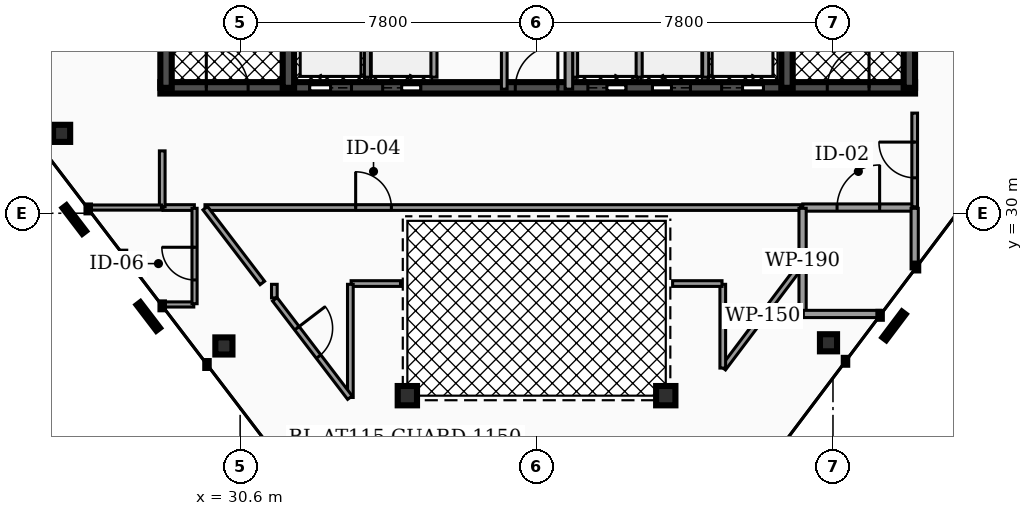
"""IFC4 building model, lengths in metres.
Left out: names, types, materials, properties, quantities, classifications, styles, units other than length and angle.
Written with IfcOpenShell. Run it as: python <this file> out.ifc"""

import sys

from ifc_helpers import new_model, si_unit, direction, frame, frame_2d, origin, origin_2d, place, context, subcontext, project, spatial, rectangle, hollow_rectangle, hollow_circle, extrude, element, fill, save


model = new_model("IFC4")
c1 = context("Model", 3, precision=1e-05, world=origin(), true_north=direction((0.0, 1.0)))
c2 = subcontext(c1, "Body", "Model", "MODEL_VIEW")
j1 = project(units=[si_unit("LENGTHUNIT", "METRE"), si_unit("PLANEANGLEUNIT", "RADIAN")], contexts=[c1])
p1 = place(None, origin())
s1 = spatial("IfcSite", under=j1, at=p1, CompositionType="ELEMENT")
p2 = place(p1, origin())
s2 = spatial("IfcBuilding", under=s1, at=p2, CompositionType="ELEMENT")
p3 = place(p2, frame((0.0, 0.0, 295.8)))
s3 = spatial("IfcBuildingStorey", under=s2, at=p3, CompositionType="ELEMENT", Elevation=295.8)
p4 = place(p3, frame((28.5, 33.3, 0.0), z_axis=(0.0, 0.0, 1.0), x_axis=(1.0, 0.0, 0.0)))
e1 = element("IfcWall", 1, at=p4, inside=s3, PredefinedType="SHEAR", context=c2, shape_type="SweptSolid", body=[
    extrude(rectangle(XDim=19.86, YDim=0.3, at=frame_2d((9.93, 0.0))), origin(), (0.0, 0.0, 1.0), 3.18),
])
p5 = place(p4, frame((3.93, 0.0, 0.0)))
e2 = element("IfcOpeningElement", 2, at=p5, cuts=e1, PredefinedType="OPENING", context=c2, shape_type="SweptSolid", body=[
    extrude(rectangle(XDim=1.1, YDim=2.15, at=frame_2d((0.55, 1.075))), frame((0.0, 0.16, 0.0), z_axis=(0.0, -1.0, 0.0), x_axis=(1.0, 0.0, 0.0)), (0.0, 0.0, 1.0), 0.32),
])
p6 = place(p4, frame((14.77, 0.0, 0.0)))
e3 = element("IfcOpeningElement", 3, at=p6, cuts=e1, PredefinedType="OPENING", context=c2, shape_type="SweptSolid", body=[
    extrude(rectangle(XDim=1.1, YDim=2.15, at=frame_2d((0.55, 1.075))), frame((0.0, 0.16, 0.0), z_axis=(0.0, -1.0, 0.0), x_axis=(1.0, 0.0, 0.0)), (0.0, 0.0, 1.0), 0.32),
])
p7 = place(p4, frame((11.25, 0.0, 0.0)))
e4 = element("IfcOpeningElement", 4, at=p7, cuts=e1, PredefinedType="OPENING", context=c2, shape_type="SweptSolid", body=[
    extrude(rectangle(XDim=1.0, YDim=2.1, at=frame_2d((0.5, 1.05))), frame((0.0, 0.16, 0.0), z_axis=(0.0, -1.0, 0.0), x_axis=(1.0, 0.0, 0.0)), (0.0, 0.0, 1.0), 0.32),
])
p8 = place(p4, frame((12.95, 0.0, 0.0)))
e5 = element("IfcOpeningElement", 5, at=p8, cuts=e1, PredefinedType="OPENING", context=c2, shape_type="SweptSolid", body=[
    extrude(rectangle(XDim=1.0, YDim=2.1, at=frame_2d((0.5, 1.05))), frame((0.0, 0.16, 0.0), z_axis=(0.0, -1.0, 0.0), x_axis=(1.0, 0.0, 0.0)), (0.0, 0.0, 1.0), 0.32),
])
p9 = place(p4, frame((5.85, 0.0, 0.0)))
e6 = element("IfcOpeningElement", 6, at=p9, cuts=e1, PredefinedType="OPENING", context=c2, shape_type="SweptSolid", body=[
    extrude(rectangle(XDim=1.0, YDim=2.1, at=frame_2d((0.5, 1.05))), frame((0.0, 0.16, 0.0), z_axis=(0.0, -1.0, 0.0), x_axis=(1.0, 0.0, 0.0)), (0.0, 0.0, 1.0), 0.32),
])
p10 = place(p4, frame((1.21, 0.0, 0.0)))
e7 = element("IfcOpeningElement", 7, at=p10, cuts=e1, PredefinedType="OPENING", context=c2, shape_type="SweptSolid", body=[
    extrude(rectangle(XDim=1.1, YDim=2.2, at=frame_2d((0.55, 1.1))), frame((0.0, 0.16, 0.0), z_axis=(0.0, -1.0, 0.0), x_axis=(1.0, 0.0, 0.0)), (0.0, 0.0, 1.0), 0.32),
])
p11 = place(p4, frame((9.34, 0.0, 0.0)))
e8 = element("IfcOpeningElement", 8, at=p11, cuts=e1, PredefinedType="OPENING", context=c2, shape_type="SweptSolid", body=[
    extrude(rectangle(XDim=1.12, YDim=2.05, at=frame_2d((0.56, 1.025))), frame((0.0, 0.16, 0.0), z_axis=(0.0, -1.0, 0.0), x_axis=(1.0, 0.0, 0.0)), (0.0, 0.0, 1.0), 0.32),
])
p12 = place(p4, frame((17.55, 0.0, 0.0)))
e9 = element("IfcOpeningElement", 9, at=p12, cuts=e1, PredefinedType="OPENING", context=c2, shape_type="SweptSolid", body=[
    extrude(rectangle(XDim=1.1, YDim=2.2, at=frame_2d((0.55, 1.1))), frame((0.0, 0.16, 0.0), z_axis=(0.0, -1.0, 0.0), x_axis=(1.0, 0.0, 0.0)), (0.0, 0.0, 1.0), 0.32),
])
for number, where, z_axis, x_axis in (
    (10, (28.65, 33.3, 0.0), (0.0, 0.0, 1.0), (0.0, 1.0, 0.0)),
    (11, (31.87, 33.3, 0.0), (0.0, 0.0, 1.0), (0.0, 1.0, 0.0)),
    (12, (44.99, 33.3, 0.0), (0.0, 0.0, 1.0), (0.0, 1.0, 0.0)),
    (13, (48.21, 33.3, 0.0), (0.0, 0.0, 1.0), (0.0, 1.0, 0.0)),
):
    element("IfcWall", number, at=place(p3, frame(where, z_axis=z_axis, x_axis=x_axis)), inside=s3, PredefinedType="SHEAR", context=c2, shape_type="SweptSolid", body=[
        extrude(rectangle(XDim=10.1, YDim=0.3, at=frame_2d((5.05, 0.0))), origin(), (0.0, 0.0, 1.0), 3.18),
    ])
p13 = place(p3, frame((25.902, 32.102, 0.0), z_axis=(0.071140979771, 0.122064544351, 0.989969296498), x_axis=(-0.863973953464, 0.503536500898, 0.0)))
e14 = element("IfcColumn", 14, at=p13, inside=s3, PredefinedType="COLUMN", context=c2, shape_type="SweptSolid", body=[
    extrude(hollow_rectangle(XDim=0.45, YDim=0.45, WallThickness=0.022, at=origin_2d()), origin(), (0.0, 0.0, 1.0), 3.212),
])
p14 = place(p3, frame((30.173, 26.508, 0.0), z_axis=(0.066891384466, 0.132340162457, 0.988944702238), x_axis=(-0.892473001286, 0.451100811321, 0.0)))
e15 = element("IfcColumn", 15, at=p14, inside=s3, PredefinedType="COLUMN", context=c2, shape_type="SweptSolid", body=[
    extrude(hollow_rectangle(XDim=0.45, YDim=0.45, WallThickness=0.022, at=origin_2d()), origin(), (0.0, 0.0, 1.0), 3.216),
])
p15 = place(p3, frame((46.082, 26.592, 0.0), z_axis=(-0.130108825885, 0.129656010946, 0.982985764013), x_axis=(-0.705873099589, -0.708338314139, 0.0)))
e16 = element("IfcColumn", 16, at=p15, inside=s3, PredefinedType="COLUMN", context=c2, shape_type="SweptSolid", body=[
    extrude(hollow_rectangle(XDim=0.45, YDim=0.45, WallThickness=0.022, at=origin_2d()), origin(), (0.0, 0.0, 1.0), 3.235),
])
for number, where, z_axis, x_axis in (
    (17, (35.0, 25.2, 0.0), (0.0, 0.0, 1.0), (1.0, 0.0, 0.0)),
    (18, (41.8, 25.2, 0.0), (0.0, 0.0, 1.0), (1.0, 0.0, 0.0)),
):
    element("IfcColumn", number, at=place(p3, frame(where, z_axis=z_axis, x_axis=x_axis)), inside=s3, PredefinedType="COLUMN", context=c2, shape_type="SweptSolid", body=[
        extrude(hollow_circle(Radius=0.254, WallThickness=0.02, at=origin_2d()), origin(), (0.0, 0.0, 1.0), 3.18),
    ])
for number, where, z_axis, x_axis in (
    (19, (33.95, 33.58, 0.0), (0.0, 0.0, 1.0), (0.0, 1.0, 0.0)),
    (20, (42.85, 33.58, 0.0), (0.0, 0.0, 1.0), (0.0, 1.0, 0.0)),
):
    element("IfcWall", number, at=place(p3, frame(where, z_axis=z_axis, x_axis=x_axis)), inside=s3, PredefinedType="SOLIDWALL", context=c2, shape_type="SweptSolid", body=[
        extrude(rectangle(XDim=2.45, YDim=0.16, at=frame_2d((1.225, 0.0))), origin(), (0.0, 0.0, 1.0), 3.18),
    ])
for number, where, z_axis, x_axis in (
    (21, (39.4, 33.58, 0.0), (0.0, 0.0, 1.0), (0.0, 1.0, 0.0)),
    (22, (41.1, 33.58, 0.0), (0.0, 0.0, 1.0), (0.0, 1.0, 0.0)),
    (23, (35.7, 33.58, 0.0), (0.0, 0.0, 1.0), (0.0, 1.0, 0.0)),
):
    element("IfcWall", number, at=place(p3, frame(where, z_axis=z_axis, x_axis=x_axis)), inside=s3, PredefinedType="SOLIDWALL", context=c2, shape_type="SweptSolid", body=[
        extrude(rectangle(XDim=2.25, YDim=0.16, at=frame_2d((1.125, 0.0))), origin(), (0.0, 0.0, 1.0), 3.18),
    ])
p16 = place(p3, frame((37.55, 33.265, 0.0), z_axis=(0.0, 0.0, 1.0), x_axis=(0.0, 1.0, 0.0)))
e24 = element("IfcWall", 24, at=p16, inside=s3, PredefinedType="PARTITIONING", context=c2, shape_type="SweptSolid", body=[
    extrude(rectangle(XDim=3.615, YDim=0.15, at=frame_2d((1.808, 0.0))), origin(), (0.0, 0.0, 1.0), 2.235),
])
p17 = place(p16, frame((1.337, 0.0, 0.0)))
e25 = element("IfcOpeningElement", 25, at=p17, cuts=e24, PredefinedType="OPENING", context=c2, shape_type="SweptSolid", body=[
    extrude(rectangle(XDim=0.94, YDim=2.05, at=frame_2d((0.47, 1.025))), frame((0.0, 0.085, 0.0), z_axis=(0.0, -1.0, 0.0), x_axis=(1.0, 0.0, 0.0)), (0.0, 0.0, 1.0), 0.17),
])
p18 = place(p3, frame((39.25, 33.265, 0.0), z_axis=(0.0, 0.0, 1.0), x_axis=(0.0, 1.0, 0.0)))
e26 = element("IfcWall", 26, at=p18, inside=s3, PredefinedType="PARTITIONING", context=c2, shape_type="SweptSolid", body=[
    extrude(rectangle(XDim=3.615, YDim=0.2, at=frame_2d((1.808, 0.0))), origin(), (0.0, 0.0, 1.0), 2.235),
])
p19 = place(p3, frame((45.405, 30.15, 0.0), z_axis=(0.0, 0.0, 1.0), x_axis=(1.0, 0.0, 0.0)))
e27 = element("IfcWall", 27, at=p19, inside=s3, PredefinedType="PARTITIONING", context=c2, shape_type="SweptSolid", body=[
    extrude(rectangle(XDim=2.925, YDim=0.19, at=frame_2d((1.462, 0.0))), origin(), (0.0, 0.0, 1.0), 2.235),
])
p20 = place(p19, frame((0.903, 0.0, 0.0)))
e28 = element("IfcOpeningElement", 28, at=p20, cuts=e27, PredefinedType="OPENING", context=c2, shape_type="SweptSolid", body=[
    extrude(rectangle(XDim=1.12, YDim=2.05, at=frame_2d((0.56, 1.025))), frame((0.0, 0.105, 0.0), z_axis=(0.0, -1.0, 0.0), x_axis=(1.0, 0.0, 0.0)), (0.0, 0.0, 1.0), 0.21),
])
p21 = place(p3, frame((29.675, 30.15, 0.0), z_axis=(0.0, 0.0, 1.0), x_axis=(1.0, 0.0, 0.0)))
e29 = element("IfcWall", 29, at=p21, inside=s3, PredefinedType="PARTITIONING", context=c2, shape_type="SweptSolid", body=[
    extrude(rectangle(XDim=15.67, YDim=0.15, at=frame_2d((7.835, 0.0))), origin(), (0.0, 0.0, 1.0), 2.235),
])
p22 = place(p21, frame((3.965, 0.0, 0.0)))
e30 = element("IfcOpeningElement", 30, at=p22, cuts=e29, PredefinedType="OPENING", context=c2, shape_type="SweptSolid", body=[
    extrude(rectangle(XDim=0.94, YDim=2.05, at=frame_2d((0.47, 1.025))), frame((0.0, 0.085, 0.0), z_axis=(0.0, -1.0, 0.0), x_axis=(1.0, 0.0, 0.0)), (0.0, 0.0, 1.0), 0.17),
])
p23 = place(p3, frame((28.57, 30.15, 0.0), z_axis=(0.0, 0.0, 1.0), x_axis=(1.0, 0.0, 0.0)))
e31 = element("IfcWall", 31, at=p23, inside=s3, PredefinedType="PARTITIONING", context=c2, shape_type="SweptSolid", body=[
    extrude(rectangle(XDim=0.825, YDim=0.15, at=frame_2d((0.413, 0.0))), origin(), (0.0, 0.0, 1.0), 2.235),
])
p24 = place(p3, frame((28.55, 30.17, 0.0), z_axis=(0.0, 0.0, 1.0), x_axis=(0.0, 1.0, 0.0)))
e32 = element("IfcWall", 32, at=p24, inside=s3, PredefinedType="PARTITIONING", context=c2, shape_type="SweptSolid", body=[
    extrude(rectangle(XDim=1.471, YDim=0.15, at=frame_2d((0.736, 0.0))), origin(), (0.0, 0.0, 1.0), 2.235),
])
p25 = place(p3, frame((48.35, 30.17, 0.0), z_axis=(0.0, 0.0, 1.0), x_axis=(0.0, 1.0, 0.0)))
e33 = element("IfcWall", 33, at=p25, inside=s3, PredefinedType="PARTITIONING", context=c2, shape_type="SweptSolid", body=[
    extrude(rectangle(XDim=2.465, YDim=0.15, at=frame_2d((1.233, 0.0))), origin(), (0.0, 0.0, 1.0), 2.235),
])
p26 = place(p25, frame((0.763, 0.0, 0.0)))
e34 = element("IfcOpeningElement", 34, at=p26, cuts=e33, PredefinedType="OPENING", context=c2, shape_type="SweptSolid", body=[
    extrude(rectangle(XDim=0.94, YDim=2.05, at=frame_2d((0.47, 1.025))), frame((0.0, 0.085, 0.0), z_axis=(0.0, -1.0, 0.0), x_axis=(1.0, 0.0, 0.0)), (0.0, 0.0, 1.0), 0.17),
])
p27 = place(p3, frame((45.4, 27.37, 0.0), z_axis=(0.0, 0.0, 1.0), x_axis=(0.0, 1.0, 0.0)))
e35 = element("IfcWall", 35, at=p27, inside=s3, PredefinedType="PARTITIONING", context=c2, shape_type="SweptSolid", body=[
    extrude(rectangle(XDim=2.76, YDim=0.19, at=frame_2d((1.38, 0.0))), origin(), (0.0, 0.0, 1.0), 2.235),
])
p28 = place(p3, frame((45.42, 27.35, 0.0), z_axis=(0.0, 0.0, 1.0), x_axis=(1.0, 0.0, 0.0)))
e36 = element("IfcWall", 36, at=p28, inside=s3, PredefinedType="PARTITIONING", context=c2, shape_type="SweptSolid", body=[
    extrude(rectangle(XDim=2.032, YDim=0.19, at=frame_2d((1.016, 0.0))), origin(), (0.0, 0.0, 1.0), 2.235),
])
p29 = place(p3, frame((48.35, 28.537, 0.0), z_axis=(0.0, 0.0, 1.0), x_axis=(0.0, 1.0, 0.0)))
e37 = element("IfcWall", 37, at=p29, inside=s3, PredefinedType="PARTITIONING", context=c2, shape_type="SweptSolid", body=[
    extrude(rectangle(XDim=1.593, YDim=0.19, at=frame_2d((0.797, 0.0))), origin(), (0.0, 0.0, 1.0), 2.235),
])
p30 = place(p3, frame((43.312, 25.922, 0.0), z_axis=(0.0, 0.0, 1.0), x_axis=(0.60171699977, 0.798709366533, 0.0)))
e38 = element("IfcWall", 38, at=p30, inside=s3, PredefinedType="PARTITIONING", context=c2, shape_type="SweptSolid", body=[
    extrude(rectangle(XDim=3.455, YDim=0.15, at=frame_2d((1.728, 0.0))), origin(), (0.0, 0.0, 1.0), 2.235),
])
p31 = place(p3, frame((43.3, 25.926, 0.0), z_axis=(0.0, 0.0, 1.0), x_axis=(0.0, 1.0, 0.0)))
e39 = element("IfcWall", 39, at=p31, inside=s3, PredefinedType="PARTITIONING", context=c2, shape_type="SweptSolid", body=[
    extrude(rectangle(XDim=2.204, YDim=0.15, at=frame_2d((1.102, 0.0))), origin(), (0.0, 0.0, 1.0), 2.235),
])
for number, where, z_axis, x_axis in (
    (40, (41.98, 28.15, 0.0), (0.0, 0.0, 1.0), (1.0, 0.0, 0.0)),
    (41, (33.52, 28.15, 0.0), (0.0, 0.0, 1.0), (1.0, 0.0, 0.0)),
):
    element("IfcWall", number, at=place(p3, frame(where, z_axis=z_axis, x_axis=x_axis)), inside=s3, PredefinedType="PARTITIONING", context=c2, shape_type="SweptSolid", body=[
        extrude(rectangle(XDim=1.3, YDim=0.15, at=frame_2d((0.65, 0.0))), origin(), (0.0, 0.0, 1.0), 2.235),
    ])
p32 = place(p3, frame((33.5, 25.153, 0.0), z_axis=(0.0, 0.0, 1.0), x_axis=(0.0, 1.0, 0.0)))
e42 = element("IfcWall", 42, at=p32, inside=s3, PredefinedType="PARTITIONING", context=c2, shape_type="SweptSolid", body=[
    extrude(rectangle(XDim=2.977, YDim=0.15, at=frame_2d((1.489, 0.0))), origin(), (0.0, 0.0, 1.0), 2.235),
])
p33 = place(p3, frame((31.512, 27.736, 0.0), z_axis=(0.0, 0.0, 1.0), x_axis=(0.606793028784, -0.794859874581, 0.0)))
e43 = element("IfcWall", 43, at=p33, inside=s3, PredefinedType="PARTITIONING", context=c2, shape_type="SweptSolid", body=[
    extrude(rectangle(XDim=3.256, YDim=0.15, at=frame_2d((1.628, 0.0))), origin(), (0.0, 0.0, 1.0), 2.235),
])
p34 = place(p33, frame((0.958, 0.0, 0.0)))
e44 = element("IfcOpeningElement", 44, at=p34, cuts=e43, PredefinedType="OPENING", context=c2, shape_type="SweptSolid", body=[
    extrude(rectangle(XDim=0.94, YDim=2.05, at=frame_2d((0.47, 1.025))), frame((0.0, 0.085, 0.0), z_axis=(0.0, -1.0, 0.0), x_axis=(1.0, 0.0, 0.0)), (0.0, 0.0, 1.0), 0.17),
])
p35 = place(p3, frame((31.5, 27.772, 0.0), z_axis=(0.0, 0.0, 1.0), x_axis=(0.0, 1.0, 0.0)))
e45 = element("IfcWall", 45, at=p35, inside=s3, PredefinedType="PARTITIONING", context=c2, shape_type="SweptSolid", body=[
    extrude(rectangle(XDim=0.358, YDim=0.15, at=frame_2d((0.179, 0.0))), origin(), (0.0, 0.0, 1.0), 2.235),
])
p36 = place(p3, frame((29.682, 30.134, 0.0), z_axis=(0.0, 0.0, 1.0), x_axis=(0.60687170499, -0.794799807299, 0.0)))
e46 = element("IfcWall", 46, at=p36, inside=s3, PredefinedType="PARTITIONING", context=c2, shape_type="SweptSolid", body=[
    extrude(rectangle(XDim=2.476, YDim=0.15, at=frame_2d((1.238, 0.0))), origin(), (0.0, 0.0, 1.0), 2.235),
])
p37 = place(p3, frame((28.536, 27.6, 0.0), z_axis=(0.0, 0.0, 1.0), x_axis=(1.0, 0.0, 0.0)))
e47 = element("IfcWall", 47, at=p37, inside=s3, PredefinedType="PARTITIONING", context=c2, shape_type="SweptSolid", body=[
    extrude(rectangle(XDim=0.844, YDim=0.135, at=frame_2d((0.422, 0.0))), origin(), (0.0, 0.0, 1.0), 2.235),
])
p38 = place(p3, frame((29.4, 27.62, 0.0), z_axis=(0.0, 0.0, 1.0), x_axis=(0.0, 1.0, 0.0)))
e48 = element("IfcWall", 48, at=p38, inside=s3, PredefinedType="PARTITIONING", context=c2, shape_type="SweptSolid", body=[
    extrude(rectangle(XDim=2.51, YDim=0.135, at=frame_2d((1.255, 0.0))), origin(), (0.0, 0.0, 1.0), 2.235),
])
p39 = place(p38, frame((0.625, 0.0, 0.0)))
e49 = element("IfcOpeningElement", 49, at=p39, cuts=e48, PredefinedType="OPENING", context=c2, shape_type="SweptSolid", body=[
    extrude(rectangle(XDim=0.86, YDim=2.05, at=frame_2d((0.43, 1.025))), frame((0.0, 0.077, 0.0), z_axis=(0.0, -1.0, 0.0), x_axis=(1.0, 0.0, 0.0)), (0.0, 0.0, 1.0), 0.155),
])
p40 = place(p3, frame((26.59, 30.15, 0.0), z_axis=(0.0, 0.0, 1.0), x_axis=(1.0, 0.0, 0.0)))
e50 = element("IfcWall", 50, at=p40, inside=s3, PredefinedType="PARTITIONING", context=c2, shape_type="SweptSolid", body=[
    extrude(rectangle(XDim=1.94, YDim=0.135, at=frame_2d((0.97, 0.0))), origin(), (0.0, 0.0, 1.0), 2.235),
])
p41 = place(p5, origin())
e51 = element("IfcDoor", 51, at=p41, inside=s3, OperationType="SLIDING_TO_LEFT", PredefinedType="DOOR", context=c2, shape_type="SweptSolid", body=[
    extrude(rectangle(XDim=1.1, YDim=2.15, at=frame_2d((0.55, 1.075))), frame((0.0, 0.025, 0.0), z_axis=(0.0, -1.0, 0.0), x_axis=(1.0, 0.0, 0.0)), (0.0, 0.0, 1.0), 0.05),
])
fill(e2, e51)
p42 = place(p6, origin())
e52 = element("IfcDoor", 52, at=p42, inside=s3, OperationType="SLIDING_TO_RIGHT", PredefinedType="DOOR", context=c2, shape_type="SweptSolid", body=[
    extrude(rectangle(XDim=1.1, YDim=2.15, at=frame_2d((0.55, 1.075))), frame((0.0, 0.025, 0.0), z_axis=(0.0, -1.0, 0.0), x_axis=(1.0, 0.0, 0.0)), (0.0, 0.0, 1.0), 0.05),
])
fill(e3, e52)
p43 = place(p7, origin())
e53 = element("IfcDoor", 53, at=p43, inside=s3, OperationType="SLIDING_TO_RIGHT", PredefinedType="DOOR", context=c2, shape_type="SweptSolid", body=[
    extrude(rectangle(XDim=1.0, YDim=2.1, at=frame_2d((0.5, 1.05))), frame((0.0, 0.025, 0.0), z_axis=(0.0, -1.0, 0.0), x_axis=(1.0, 0.0, 0.0)), (0.0, 0.0, 1.0), 0.05),
])
fill(e4, e53)
p44 = place(p8, origin())
e54 = element("IfcDoor", 54, at=p44, inside=s3, OperationType="SLIDING_TO_LEFT", PredefinedType="DOOR", context=c2, shape_type="SweptSolid", body=[
    extrude(rectangle(XDim=1.0, YDim=2.1, at=frame_2d((0.5, 1.05))), frame((0.0, 0.025, 0.0), z_axis=(0.0, -1.0, 0.0), x_axis=(1.0, 0.0, 0.0)), (0.0, 0.0, 1.0), 0.05),
])
fill(e5, e54)
p45 = place(p9, origin())
e55 = element("IfcDoor", 55, at=p45, inside=s3, OperationType="SLIDING_TO_RIGHT", PredefinedType="DOOR", context=c2, shape_type="SweptSolid", body=[
    extrude(rectangle(XDim=1.0, YDim=2.1, at=frame_2d((0.5, 1.05))), frame((0.0, 0.025, 0.0), z_axis=(0.0, -1.0, 0.0), x_axis=(1.0, 0.0, 0.0)), (0.0, 0.0, 1.0), 0.05),
])
fill(e6, e55)
p46 = place(p10, origin())
e56 = element("IfcDoor", 56, at=p46, inside=s3, OperationType="SINGLE_SWING_LEFT", PredefinedType="DOOR", context=c2, shape_type="SweptSolid", body=[
    extrude(rectangle(XDim=1.1, YDim=2.2, at=frame_2d((0.55, 1.1))), frame((0.0, 0.025, 0.0), z_axis=(0.0, -1.0, 0.0), x_axis=(1.0, 0.0, 0.0)), (0.0, 0.0, 1.0), 0.05),
])
fill(e7, e56)
p47 = place(p11, origin())
e57 = element("IfcDoor", 57, at=p47, inside=s3, OperationType="SINGLE_SWING_RIGHT", PredefinedType="DOOR", context=c2, shape_type="SweptSolid", body=[
    extrude(rectangle(XDim=1.12, YDim=2.05, at=frame_2d((0.56, 1.025))), frame((0.0, 0.025, 0.0), z_axis=(0.0, -1.0, 0.0), x_axis=(1.0, 0.0, 0.0)), (0.0, 0.0, 1.0), 0.05),
])
fill(e8, e57)
p48 = place(p12, origin())
e58 = element("IfcDoor", 58, at=p48, inside=s3, OperationType="SINGLE_SWING_RIGHT", PredefinedType="DOOR", context=c2, shape_type="SweptSolid", body=[
    extrude(rectangle(XDim=1.1, YDim=2.2, at=frame_2d((0.55, 1.1))), frame((0.0, 0.025, 0.0), z_axis=(0.0, -1.0, 0.0), x_axis=(1.0, 0.0, 0.0)), (0.0, 0.0, 1.0), 0.05),
])
fill(e9, e58)
p49 = place(p20, origin())
e59 = element("IfcDoor", 59, at=p49, inside=s3, OperationType="SINGLE_SWING_RIGHT", PredefinedType="DOOR", context=c2, shape_type="SweptSolid", body=[
    extrude(rectangle(XDim=1.12, YDim=2.05, at=frame_2d((0.56, 1.025))), frame((0.0, 0.025, 0.0), z_axis=(0.0, -1.0, 0.0), x_axis=(1.0, 0.0, 0.0)), (0.0, 0.0, 1.0), 0.05),
])
fill(e28, e59)
p50 = place(p22, origin())
e60 = element("IfcDoor", 60, at=p50, inside=s3, OperationType="SINGLE_SWING_LEFT", PredefinedType="DOOR", context=c2, shape_type="SweptSolid", body=[
    extrude(rectangle(XDim=0.94, YDim=2.05, at=frame_2d((0.47, 1.025))), frame((0.0, 0.025, 0.0), z_axis=(0.0, -1.0, 0.0), x_axis=(1.0, 0.0, 0.0)), (0.0, 0.0, 1.0), 0.05),
])
fill(e30, e60)
p51 = place(p26, origin())
e61 = element("IfcDoor", 61, at=p51, inside=s3, OperationType="SINGLE_SWING_RIGHT", PredefinedType="DOOR", context=c2, shape_type="SweptSolid", body=[
    extrude(rectangle(XDim=0.94, YDim=2.05, at=frame_2d((0.47, 1.025))), frame((0.0, 0.025, 0.0), z_axis=(0.0, -1.0, 0.0), x_axis=(1.0, 0.0, 0.0)), (0.0, 0.0, 1.0), 0.05),
])
fill(e34, e61)
p52 = place(p34, origin())
e62 = element("IfcDoor", 62, at=p52, inside=s3, OperationType="SINGLE_SWING_LEFT", PredefinedType="DOOR", context=c2, shape_type="SweptSolid", body=[
    extrude(rectangle(XDim=0.94, YDim=2.05, at=frame_2d((0.47, 1.025))), frame((0.0, 0.025, 0.0), z_axis=(0.0, -1.0, 0.0), x_axis=(1.0, 0.0, 0.0)), (0.0, 0.0, 1.0), 0.05),
])
fill(e44, e62)
p53 = place(p39, origin())
e63 = element("IfcDoor", 63, at=p53, inside=s3, OperationType="SINGLE_SWING_RIGHT", PredefinedType="DOOR", context=c2, shape_type="SweptSolid", body=[
    extrude(rectangle(XDim=0.86, YDim=2.05, at=frame_2d((0.43, 1.025))), frame((0.0, 0.025, 0.0), z_axis=(0.0, -1.0, 0.0), x_axis=(1.0, 0.0, 0.0)), (0.0, 0.0, 1.0), 0.05),
])
fill(e49, e63)
save(model, sys.argv[1])
